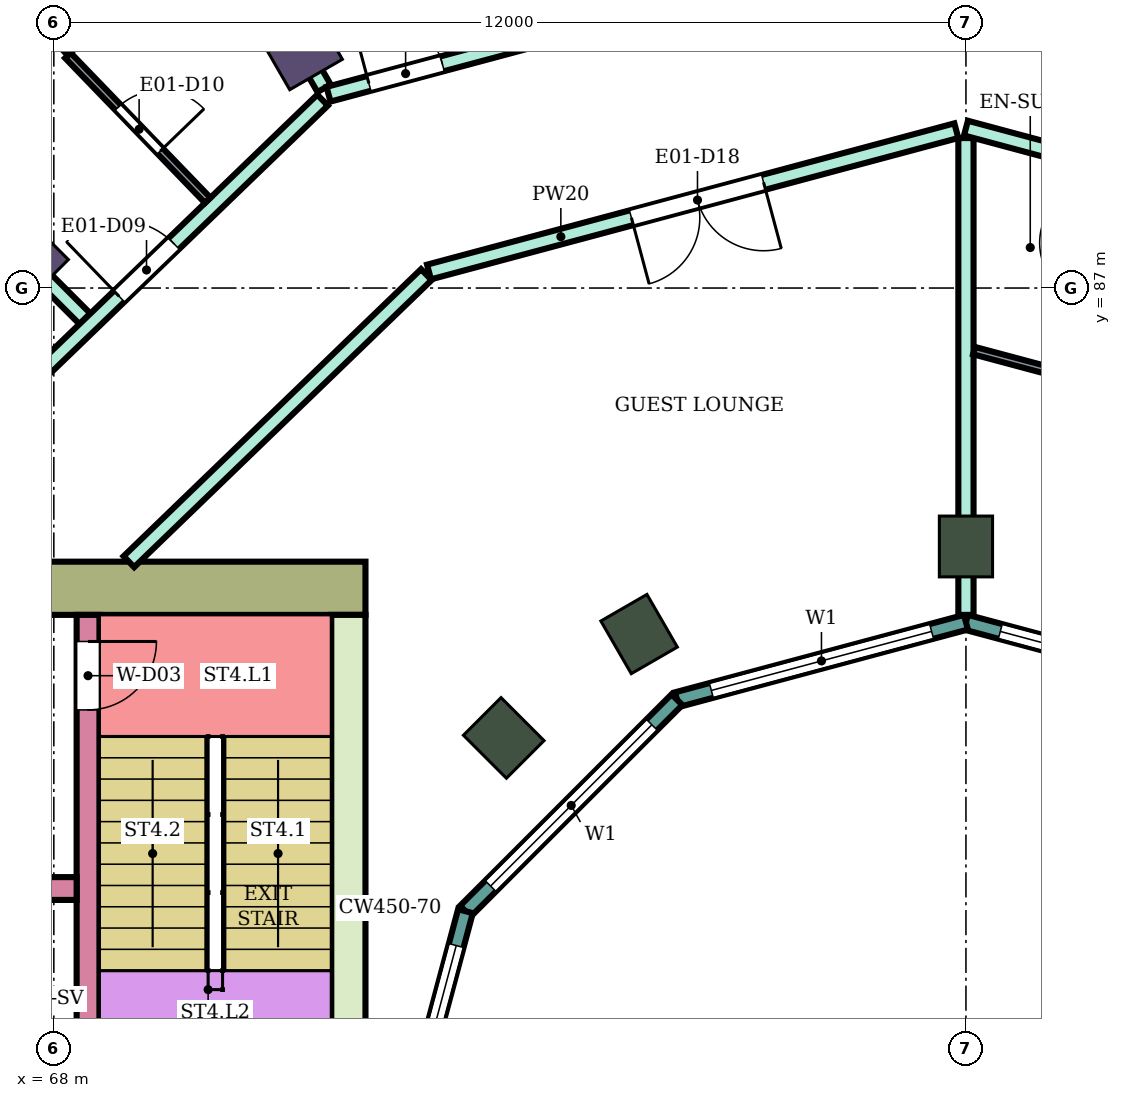
"""IFC4 building model, lengths in metres.
Left out: names, types, materials, properties, quantities, classifications, styles, units other than length and angle.
Written with IfcOpenShell. Run it as: python <this file> out.ifc"""

import sys

from ifc_helpers import new_model, si_unit, direction, frame, frame_2d, origin, origin_2d, place, context, subcontext, project, spatial, rectangle, extrude, element, fill, save


model = new_model("IFC4")
c1 = context("Model", 3, precision=1e-05, world=origin(), true_north=direction((0.0, 1.0)))
c2 = subcontext(c1, "Body", "Model", "MODEL_VIEW")
j1 = project(units=[si_unit("LENGTHUNIT", "METRE"), si_unit("PLANEANGLEUNIT", "RADIAN")], contexts=[c1])
p1 = place(None, origin())
s1 = spatial("IfcSite", under=j1, at=p1, CompositionType="ELEMENT")
p2 = place(p1, origin())
s2 = spatial("IfcBuilding", under=s1, at=p2, CompositionType="ELEMENT")
p3 = place(p2, frame((0.0, 0.0, 122.4)))
s3 = spatial("IfcBuildingStorey", under=s2, at=p3, CompositionType="ELEMENT", Elevation=122.4)
for number, where, z_axis, x_axis in (
    (1, (71.2, 90.242, 0.0), (0.0, 0.0, 1.0), (-0.5, 0.866, 0.0)),
    (2, (67.555, 87.445, 0.0), (0.0, 0.0, 1.0), (-0.707, 0.707, 0.0)),
):
    element("IfcColumn", number, at=place(p3, frame(where, z_axis=z_axis, x_axis=x_axis)), inside=s3, PredefinedType="COLUMN", context=c2, shape_type="SweptSolid", body=[
        extrude(rectangle(XDim=1.0, YDim=0.8, at=origin_2d()), origin(), (0.0, 0.0, 1.0), 3.9),
    ])
for number, where, z_axis, x_axis in (
    (3, (80.0, 83.6, 0.0), (0.0, 0.0, 1.0), (0.0, 1.0, 0.0)),
    (4, (75.7, 82.448, 0.0), (0.0, 0.0, 1.0), (-0.5, 0.866, 0.0)),
    (5, (73.919, 81.081, 0.0), (0.0, 0.0, 1.0), (-0.707, 0.707, 0.0)),
):
    element("IfcColumn", number, at=place(p3, frame(where, z_axis=z_axis, x_axis=x_axis)), inside=s3, PredefinedType="COLUMN", context=c2, shape_type="SweptSolid", body=[
        extrude(rectangle(XDim=0.8, YDim=0.7, at=origin_2d()), origin(), (0.0, 0.0, 1.0), 3.9),
    ])
p4 = place(p3, frame((72.1, 83.05, 0.0), z_axis=(0.0, 0.0, 1.0), x_axis=(-1.0, 0.0, 0.0)))
e6 = element("IfcWall", 6, at=p4, inside=s3, PredefinedType="SHEAR", context=c2, shape_type="SweptSolid", body=[
    extrude(rectangle(XDim=14.8, YDim=0.7, at=frame_2d((7.4, 0.0))), origin(), (0.0, 0.0, 1.0), 3.58),
])
p5 = place(p4, frame((4.2, 0.0, 0.0)))
e7 = element("IfcOpeningElement", 7, at=p5, cuts=e6, PredefinedType="OPENING", context=c2, shape_type="SweptSolid", body=[
    extrude(rectangle(XDim=2.4, YDim=2.4, at=frame_2d((1.2, 1.2))), frame((0.0, 0.36, 0.0), z_axis=(0.0, -1.0, 0.0), x_axis=(1.0, 0.0, 0.0)), (0.0, 0.0, 1.0), 0.72),
])
p6 = place(p3, frame((71.875, 82.7, 0.0), z_axis=(0.0, 0.0, 1.0), x_axis=(0.0, -1.0, 0.0)))
e8 = element("IfcWall", 8, at=p6, inside=s3, PredefinedType="SHEAR", context=c2, shape_type="SweptSolid", body=[
    extrude(rectangle(XDim=7.7, YDim=0.45, at=frame_2d((3.85, 0.0))), origin(), (0.0, 0.0, 1.0), 3.58),
])
p7 = place(p3, frame((68.45, 82.7, 0.0), z_axis=(0.0, 0.0, 1.0), x_axis=(0.0, -1.0, 0.0)))
e9 = element("IfcWall", 9, at=p7, inside=s3, PredefinedType="SHEAR", context=c2, shape_type="SweptSolid", body=[
    extrude(rectangle(XDim=7.7, YDim=0.3, at=frame_2d((3.85, 0.0))), origin(), (0.0, 0.0, 1.0), 3.58),
])
p8 = place(p7, frame((0.35, 0.0, 0.0)))
e10 = element("IfcOpeningElement", 10, at=p8, cuts=e9, PredefinedType="OPENING", context=c2, shape_type="SweptSolid", body=[
    extrude(rectangle(XDim=0.9, YDim=2.1, at=frame_2d((0.45, 1.05))), frame((0.0, 0.16, 0.0), z_axis=(0.0, -1.0, 0.0), x_axis=(1.0, 0.0, 0.0)), (0.0, 0.0, 1.0), 0.32),
])
p9 = place(p3, frame((68.3, 79.1, 0.0), z_axis=(0.0, 0.0, 1.0), x_axis=(-1.0, 0.0, 0.0)))
e11 = element("IfcWall", 11, at=p9, inside=s3, PredefinedType="SHEAR", context=c2, shape_type="SweptSolid", body=[
    extrude(rectangle(XDim=11.0, YDim=0.3, at=frame_2d((5.5, 0.0))), origin(), (0.0, 0.0, 1.0), 3.58),
])
p10 = place(p9, frame((0.4, 0.0, 0.0)))
e12 = element("IfcOpeningElement", 12, at=p10, cuts=e11, PredefinedType="OPENING", context=c2, shape_type="SweptSolid", body=[
    extrude(rectangle(XDim=1.4, YDim=2.1, at=frame_2d((0.7, 1.05))), frame((0.0, 0.16, 0.0), z_axis=(0.0, -1.0, 0.0), x_axis=(1.0, 0.0, 0.0)), (0.0, 0.0, 1.0), 0.32),
])
p11 = place(p9, frame((5.4, 0.0, 0.0)))
e13 = element("IfcOpeningElement", 13, at=p11, cuts=e11, PredefinedType="OPENING", context=c2, shape_type="SweptSolid", body=[
    extrude(rectangle(XDim=1.4, YDim=2.1, at=frame_2d((0.7, 1.05))), frame((0.0, 0.16, 0.0), z_axis=(0.0, -1.0, 0.0), x_axis=(1.0, 0.0, 0.0)), (0.0, 0.0, 1.0), 0.32),
])
p12 = place(p9, frame((8.1, 0.0, 0.0)))
e14 = element("IfcOpeningElement", 14, at=p12, cuts=e11, PredefinedType="OPENING", context=c2, shape_type="SweptSolid", body=[
    extrude(rectangle(XDim=1.0, YDim=2.1, at=frame_2d((0.5, 1.05))), frame((0.0, 0.16, 0.0), z_axis=(0.0, -1.0, 0.0), x_axis=(1.0, 0.0, 0.0)), (0.0, 0.0, 1.0), 0.32),
])
p13 = place(p3, frame((83.802, 81.585, 0.0), z_axis=(0.0, 0.0, 1.0), x_axis=(-0.965933654434, 0.258789828301, 0.0)))
e15 = element("IfcWall", 15, at=p13, inside=s3, PredefinedType="NOTDEFINED", context=c2, shape_type="SweptSolid", body=[
    extrude(rectangle(XDim=3.936, YDim=0.2, at=frame_2d((1.968, 0.0))), origin(), (0.0, 0.0, 1.0), 3.9),
])
p14 = place(p13, frame((0.468, 0.0, 0.9)))
e16 = element("IfcOpeningElement", 16, at=p14, cuts=e15, PredefinedType="OPENING", context=c2, shape_type="SweptSolid", body=[
    extrude(rectangle(XDim=3.0, YDim=2.3, at=frame_2d((1.5, 1.15))), frame((0.0, 0.11, 0.0), z_axis=(0.0, -1.0, 0.0), x_axis=(1.0, 0.0, 0.0)), (0.0, 0.0, 1.0), 0.22),
])
p15 = place(p3, frame((80.0, 82.604, 0.0), z_axis=(0.0, 0.0, 1.0), x_axis=(-0.965933654434, -0.258789828301, 0.0)))
e17 = element("IfcWall", 17, at=p15, inside=s3, PredefinedType="NOTDEFINED", context=c2, shape_type="SweptSolid", body=[
    extrude(rectangle(XDim=3.936, YDim=0.2, at=frame_2d((1.968, 0.0))), origin(), (0.0, 0.0, 1.0), 3.9),
])
p16 = place(p15, frame((0.468, 0.0, 0.9)))
e18 = element("IfcOpeningElement", 18, at=p16, cuts=e17, PredefinedType="OPENING", context=c2, shape_type="SweptSolid", body=[
    extrude(rectangle(XDim=3.0, YDim=2.3, at=frame_2d((1.5, 1.15))), frame((0.0, 0.11, 0.0), z_axis=(0.0, -1.0, 0.0), x_axis=(1.0, 0.0, 0.0)), (0.0, 0.0, 1.0), 0.22),
])
p17 = place(p3, frame((76.198, 81.585, 0.0), z_axis=(0.0, 0.0, 1.0), x_axis=(-0.707106781187, -0.707106781187, 0.0)))
e19 = element("IfcWall", 19, at=p17, inside=s3, PredefinedType="NOTDEFINED", context=c2, shape_type="SweptSolid", body=[
    extrude(rectangle(XDim=3.936, YDim=0.2, at=frame_2d((1.968, 0.0))), origin(), (0.0, 0.0, 1.0), 3.9),
])
p18 = place(p17, frame((0.468, 0.0, 0.9)))
e20 = element("IfcOpeningElement", 20, at=p18, cuts=e19, PredefinedType="OPENING", context=c2, shape_type="SweptSolid", body=[
    extrude(rectangle(XDim=3.0, YDim=2.3, at=frame_2d((1.5, 1.15))), frame((0.0, 0.11, 0.0), z_axis=(0.0, -1.0, 0.0), x_axis=(1.0, 0.0, 0.0)), (0.0, 0.0, 1.0), 0.22),
])
p19 = place(p3, frame((73.415, 78.802, 0.0), z_axis=(0.0, 0.0, 1.0), x_axis=(-0.258789828301, -0.965933654434, 0.0)))
e21 = element("IfcWall", 21, at=p19, inside=s3, PredefinedType="NOTDEFINED", context=c2, shape_type="SweptSolid", body=[
    extrude(rectangle(XDim=3.936, YDim=0.2, at=frame_2d((1.968, 0.0))), origin(), (0.0, 0.0, 1.0), 3.9),
])
p20 = place(p19, frame((0.468, 0.0, 0.9)))
e22 = element("IfcOpeningElement", 22, at=p20, cuts=e21, PredefinedType="OPENING", context=c2, shape_type="SweptSolid", body=[
    extrude(rectangle(XDim=3.0, YDim=2.3, at=frame_2d((1.5, 1.15))), frame((0.0, 0.11, 0.0), z_axis=(0.0, -1.0, 0.0), x_axis=(1.0, 0.0, 0.0)), (0.0, 0.0, 1.0), 0.22),
])
p21 = place(p3, frame((63.598, 91.408, 0.0), z_axis=(0.0, 0.0, 1.0), x_axis=(0.706963264491, -0.707250268759, 0.0)))
e23 = element("IfcWall", 23, at=p21, inside=s3, PredefinedType="PARTITIONING", context=c2, shape_type="SweptSolid", body=[
    extrude(rectangle(XDim=6.805, YDim=0.2, at=frame_2d((3.403, 0.0))), origin(), (0.0, 0.0, 1.0), 3.45),
])
p22 = place(p3, frame((66.797, 84.9, 0.0), z_axis=(0.0, 0.0, 1.0), x_axis=(0.719692092412, 0.694293376116, 0.0)))
e24 = element("IfcWall", 24, at=p22, inside=s3, PredefinedType="PARTITIONING", context=c2, shape_type="SweptSolid", body=[
    extrude(rectangle(XDim=6.584, YDim=0.2, at=frame_2d((3.292, 0.0))), origin(), (0.0, 0.0, 1.0), 3.45),
])
p23 = place(p22, frame((2.866, 0.0, 0.0)))
e25 = element("IfcOpeningElement", 25, at=p23, cuts=e24, PredefinedType="OPENING", context=c2, shape_type="SweptSolid", body=[
    extrude(rectangle(XDim=1.0, YDim=2.1, at=frame_2d((0.5, 1.05))), frame((0.0, 0.11, 0.0), z_axis=(0.0, -1.0, 0.0), x_axis=(1.0, 0.0, 0.0)), (0.0, 0.0, 1.0), 0.22),
])
p24 = place(p3, frame((67.102, 97.342, 0.0), z_axis=(0.0, 0.0, 1.0), x_axis=(0.499927298089, -0.866067374183, 0.0)))
e26 = element("IfcWall", 26, at=p24, inside=s3, PredefinedType="PARTITIONING", context=c2, shape_type="SweptSolid", body=[
    extrude(rectangle(XDim=8.907, YDim=0.2, at=frame_2d((4.454, 0.0))), origin(), (0.0, 0.0, 1.0), 3.45),
])
p25 = place(p3, frame((68.987, 83.4, 0.0), z_axis=(0.0, 0.0, 1.0), x_axis=(0.719586298962, 0.694403022997, 0.0)))
e27 = element("IfcWall", 27, at=p25, inside=s3, PredefinedType="PARTITIONING", context=c2, shape_type="SweptSolid", body=[
    extrude(rectangle(XDim=5.439, YDim=0.2, at=frame_2d((2.719, 0.0))), origin(), (0.0, 0.0, 1.0), 3.45),
])
p26 = place(p3, frame((71.614, 89.55, 0.0), z_axis=(0.0, 0.0, 1.0), x_axis=(0.965967958589, 0.258661753994, 0.0)))
e28 = element("IfcWall", 28, at=p26, inside=s3, PredefinedType="PARTITIONING", context=c2, shape_type="SweptSolid", body=[
    extrude(rectangle(XDim=8.592, YDim=0.2, at=frame_2d((4.296, 0.0))), origin(), (0.0, 0.0, 1.0), 3.45),
])
p27 = place(p26, frame((0.55, 0.0, 0.0)))
e29 = element("IfcOpeningElement", 29, at=p27, cuts=e28, PredefinedType="OPENING", context=c2, shape_type="SweptSolid", body=[
    extrude(rectangle(XDim=1.0, YDim=2.1, at=frame_2d((0.5, 1.05))), frame((0.0, 0.11, 0.0), z_axis=(0.0, -1.0, 0.0), x_axis=(1.0, 0.0, 0.0)), (0.0, 0.0, 1.0), 0.22),
])
p28 = place(p3, frame((72.936, 87.211, 0.0), z_axis=(0.0, 0.0, 1.0), x_axis=(0.965917703859, 0.258849356521, 0.0)))
e30 = element("IfcWall", 30, at=p28, inside=s3, PredefinedType="PARTITIONING", context=c2, shape_type="SweptSolid", body=[
    extrude(rectangle(XDim=7.182, YDim=0.2, at=frame_2d((3.591, 0.0))), origin(), (0.0, 0.0, 1.0), 3.45),
])
p29 = place(p28, frame((2.757, 0.0, 0.0)))
e31 = element("IfcOpeningElement", 31, at=p29, cuts=e30, PredefinedType="OPENING", context=c2, shape_type="SweptSolid", body=[
    extrude(rectangle(XDim=1.8, YDim=2.1, at=frame_2d((0.9, 1.05))), frame((0.0, 0.11, 0.0), z_axis=(0.0, -1.0, 0.0), x_axis=(1.0, 0.0, 0.0)), (0.0, 0.0, 1.0), 0.22),
])
p30 = place(p3, frame((80.0, 82.7, 0.0), z_axis=(0.0, 0.0, 1.0), x_axis=(0.0, 1.0, 0.0)))
e32 = element("IfcWall", 32, at=p30, inside=s3, PredefinedType="PARTITIONING", context=c2, shape_type="SweptSolid", body=[
    extrude(rectangle(XDim=6.273, YDim=0.2, at=frame_2d((3.136, 0.0))), origin(), (0.0, 0.0, 1.0), 3.45),
])
p31 = place(p3, frame((80.0, 89.104, 0.0), z_axis=(0.0, 0.0, 1.0), x_axis=(0.965856548257, -0.259077455964, 0.0)))
e33 = element("IfcWall", 33, at=p31, inside=s3, PredefinedType="PARTITIONING", context=c2, shape_type="SweptSolid", body=[
    extrude(rectangle(XDim=7.173, YDim=0.2, at=frame_2d((3.586, 0.0))), origin(), (0.0, 0.0, 1.0), 3.45),
])
p32 = place(p31, frame((5.763, 0.0, 0.0)))
e34 = element("IfcOpeningElement", 34, at=p32, cuts=e33, PredefinedType="OPENING", context=c2, shape_type="SweptSolid", body=[
    extrude(rectangle(XDim=1.0, YDim=2.1, at=frame_2d((0.5, 1.05))), frame((0.0, 0.11, 0.0), z_axis=(0.0, -1.0, 0.0), x_axis=(1.0, 0.0, 0.0)), (0.0, 0.0, 1.0), 0.22),
])
p33 = place(p3, frame((80.0, 91.797, 0.0), z_axis=(0.0, 0.0, 1.0), x_axis=(0.965857042792, -0.259075612301, 0.0)))
e35 = element("IfcWall", 35, at=p33, inside=s3, PredefinedType="PARTITIONING", context=c2, shape_type="SweptSolid", body=[
    extrude(rectangle(XDim=8.602, YDim=0.2, at=frame_2d((4.301, 0.0))), origin(), (0.0, 0.0, 1.0), 3.45),
])
p34 = place(p33, frame((4.877, 0.0, 0.0)))
e36 = element("IfcOpeningElement", 36, at=p34, cuts=e35, PredefinedType="OPENING", context=c2, shape_type="SweptSolid", body=[
    extrude(rectangle(XDim=1.0, YDim=2.1, at=frame_2d((0.5, 1.05))), frame((0.0, 0.11, 0.0), z_axis=(0.0, -1.0, 0.0), x_axis=(1.0, 0.0, 0.0)), (0.0, 0.0, 1.0), 0.22),
])
p35 = place(p33, frame((2.817, 0.0, 0.0)))
e37 = element("IfcOpeningElement", 37, at=p35, cuts=e35, PredefinedType="OPENING", context=c2, shape_type="SweptSolid", body=[
    extrude(rectangle(XDim=1.0, YDim=2.1, at=frame_2d((0.5, 1.05))), frame((0.0, 0.11, 0.0), z_axis=(0.0, -1.0, 0.0), x_axis=(1.0, 0.0, 0.0)), (0.0, 0.0, 1.0), 0.22),
])
p36 = place(p3, frame((68.185, 90.06, 0.0), z_axis=(0.0, 0.0, 1.0), x_axis=(0.69446127412, -0.719530081892, 0.0)))
e38 = element("IfcWall", 38, at=p36, inside=s3, PredefinedType="PARTITIONING", context=c2, shape_type="SweptSolid", body=[
    extrude(rectangle(XDim=2.649, YDim=0.1, at=frame_2d((1.324, 0.0))), origin(), (0.0, 0.0, 1.0), 3.45),
])
p37 = place(p36, frame((0.95, 0.0, 0.0)))
e39 = element("IfcOpeningElement", 39, at=p37, cuts=e38, PredefinedType="OPENING", context=c2, shape_type="SweptSolid", body=[
    extrude(rectangle(XDim=0.8, YDim=2.1, at=frame_2d((0.4, 1.05))), frame((0.0, 0.06, 0.0), z_axis=(0.0, -1.0, 0.0), x_axis=(1.0, 0.0, 0.0)), (0.0, 0.0, 1.0), 0.12),
])
p38 = place(p3, frame((68.15, 90.096, 0.0), z_axis=(0.0, 0.0, 1.0), x_axis=(0.719667544954, 0.694318820672, 0.0)))
e40 = element("IfcWall", 40, at=p38, inside=s3, PredefinedType="PARTITIONING", context=c2, shape_type="SweptSolid", body=[
    extrude(rectangle(XDim=2.687, YDim=0.1, at=frame_2d((1.344, 0.0))), origin(), (0.0, 0.0, 1.0), 3.45),
])
p39 = place(p3, frame((80.106, 86.177, 0.0), z_axis=(0.0, 0.0, 1.0), x_axis=(0.966002973184, -0.258530957139, 0.0)))
e41 = element("IfcWall", 41, at=p39, inside=s3, PredefinedType="PARTITIONING", context=c2, shape_type="SweptSolid", body=[
    extrude(rectangle(XDim=1.19, YDim=0.1, at=frame_2d((0.595, 0.0))), origin(), (0.0, 0.0, 1.0), 3.45),
])
p40 = place(p14, origin())
e42 = element("IfcWindow", 42, at=p40, inside=s3, PartitioningType="SINGLE_PANEL", PredefinedType="WINDOW", context=c2, shape_type="SweptSolid", body=[
    extrude(rectangle(XDim=3.0, YDim=2.3, at=frame_2d((1.5, 1.15))), frame((0.0, 0.03, 0.0), z_axis=(0.0, -1.0, 0.0), x_axis=(1.0, 0.0, 0.0)), (0.0, 0.0, 1.0), 0.06),
])
fill(e16, e42)
p41 = place(p16, origin())
e43 = element("IfcWindow", 43, at=p41, inside=s3, PartitioningType="SINGLE_PANEL", PredefinedType="WINDOW", context=c2, shape_type="SweptSolid", body=[
    extrude(rectangle(XDim=3.0, YDim=2.3, at=frame_2d((1.5, 1.15))), frame((0.0, 0.03, 0.0), z_axis=(0.0, -1.0, 0.0), x_axis=(1.0, 0.0, 0.0)), (0.0, 0.0, 1.0), 0.06),
])
fill(e18, e43)
p42 = place(p18, origin())
e44 = element("IfcWindow", 44, at=p42, inside=s3, PartitioningType="SINGLE_PANEL", PredefinedType="WINDOW", context=c2, shape_type="SweptSolid", body=[
    extrude(rectangle(XDim=3.0, YDim=2.3, at=frame_2d((1.5, 1.15))), frame((0.0, 0.03, 0.0), z_axis=(0.0, -1.0, 0.0), x_axis=(1.0, 0.0, 0.0)), (0.0, 0.0, 1.0), 0.06),
])
fill(e20, e44)
p43 = place(p20, origin())
e45 = element("IfcWindow", 45, at=p43, inside=s3, PartitioningType="SINGLE_PANEL", PredefinedType="WINDOW", context=c2, shape_type="SweptSolid", body=[
    extrude(rectangle(XDim=3.0, YDim=2.3, at=frame_2d((1.5, 1.15))), frame((0.0, 0.03, 0.0), z_axis=(0.0, -1.0, 0.0), x_axis=(1.0, 0.0, 0.0)), (0.0, 0.0, 1.0), 0.06),
])
fill(e22, e45)
p44 = place(p27, origin())
e46 = element("IfcDoor", 46, at=p44, inside=s3, OperationType="SINGLE_SWING_LEFT", PredefinedType="DOOR", context=c2, shape_type="SweptSolid", body=[
    extrude(rectangle(XDim=1.0, YDim=2.1, at=frame_2d((0.5, 1.05))), frame((0.0, 0.025, 0.0), z_axis=(0.0, -1.0, 0.0), x_axis=(1.0, 0.0, 0.0)), (0.0, 0.0, 1.0), 0.05),
])
fill(e29, e46)
p45 = place(p23, origin())
e47 = element("IfcDoor", 47, at=p45, inside=s3, OperationType="SINGLE_SWING_LEFT", PredefinedType="DOOR", context=c2, shape_type="SweptSolid", body=[
    extrude(rectangle(XDim=1.0, YDim=2.1, at=frame_2d((0.5, 1.05))), frame((0.0, 0.025, 0.0), z_axis=(0.0, -1.0, 0.0), x_axis=(1.0, 0.0, 0.0)), (0.0, 0.0, 1.0), 0.05),
])
fill(e25, e47)
p46 = place(p37, origin())
e48 = element("IfcDoor", 48, at=p46, inside=s3, OperationType="SINGLE_SWING_RIGHT", PredefinedType="DOOR", context=c2, shape_type="SweptSolid", body=[
    extrude(rectangle(XDim=0.8, YDim=2.1, at=frame_2d((0.4, 1.05))), frame((0.0, 0.025, 0.0), z_axis=(0.0, -1.0, 0.0), x_axis=(1.0, 0.0, 0.0)), (0.0, 0.0, 1.0), 0.05),
])
fill(e39, e48)
p47 = place(p29, frame((1.8, 0.0, 0.0), z_axis=(0.0, 0.0, 1.0), x_axis=(-1.0, 0.0, 0.0)))
e49 = element("IfcDoor", 49, at=p47, inside=s3, OperationType="DOUBLE_DOOR_SINGLE_SWING", PredefinedType="DOOR", context=c2, shape_type="SweptSolid", body=[
    extrude(rectangle(XDim=1.8, YDim=2.1, at=frame_2d((0.9, 1.05))), frame((0.0, 0.025, 0.0), z_axis=(0.0, -1.0, 0.0), x_axis=(1.0, 0.0, 0.0)), (0.0, 0.0, 1.0), 0.05),
])
fill(e31, e49)
p48 = place(p8, origin())
e50 = element("IfcDoor", 50, at=p48, inside=s3, OperationType="SINGLE_SWING_LEFT", PredefinedType="DOOR", context=c2, shape_type="SweptSolid", body=[
    extrude(rectangle(XDim=0.9, YDim=2.1, at=frame_2d((0.45, 1.05))), frame((0.0, 0.025, 0.0), z_axis=(0.0, -1.0, 0.0), x_axis=(1.0, 0.0, 0.0)), (0.0, 0.0, 1.0), 0.05),
])
fill(e10, e50)
save(model, sys.argv[1])
